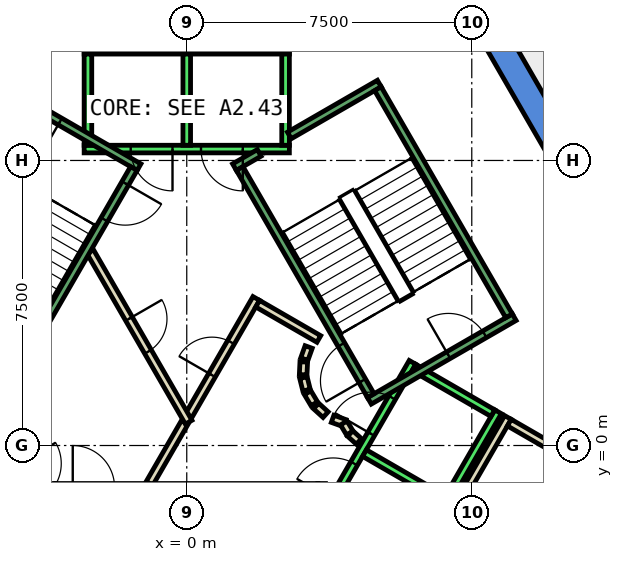
"""IFC4 building model, lengths in metres.
Left out: names, types, materials, properties, quantities, classifications, styles, units other than length and angle.
Written with IfcOpenShell. Run it as: python <this file> out.ifc"""

import sys

from ifc_helpers import new_model, si_unit, direction, frame, frame_2d, origin, place, context, subcontext, project, spatial, polyline, rectangle, outline, extrude, element, fill, save


model = new_model("IFC4")
c1 = context("Model", 3, precision=1e-05, world=origin(), true_north=direction((0.0, 1.0)))
c2 = subcontext(c1, "Body", "Model", "MODEL_VIEW")
j1 = project(units=[si_unit("LENGTHUNIT", "METRE"), si_unit("PLANEANGLEUNIT", "RADIAN")], contexts=[c1])
p1 = place(None, origin())
s1 = spatial("IfcSite", under=j1, at=p1, CompositionType="ELEMENT")
p2 = place(p1, origin())
s2 = spatial("IfcBuilding", under=s1, at=p2, CompositionType="ELEMENT")
p3 = place(p2, frame((0.0, 0.0, 210.8)))
s3 = spatial("IfcBuildingStorey", under=s2, at=p3, CompositionType="ELEMENT", Elevation=210.8)
p4 = place(p3, frame((0.0, 0.0, -0.4)))
e1 = element("IfcWall", 1, at=p4, inside=s3, PredefinedType="SHEAR", context=c2, shape_type="SweptSolid", body=[
    extrude(outline(polyline([(8.084, 11.498), (7.478, 11.148), (12.471, 2.5), (13.279, 2.5), (8.084, 11.498)])), origin(), (0.0, 0.0, 1.0), 4.2),
])
p5 = place(p3, frame((0.0, 0.0, -0.4)))
e2 = element("IfcWall", 2, at=p5, inside=s3, PredefinedType="SHEAR", context=c2, shape_type="SweptSolid", body=[
    extrude(outline(polyline([(6.64, -9.0), (13.279, 2.5), (12.471, 2.5), (6.235, -8.3), (6.64, -9.0)])), origin(), (0.0, 0.0, 1.0), 4.2),
])
p6 = place(p3, frame((5.751, -3.938, 0.0), z_axis=(0.0, 0.0, 1.0), x_axis=(0.500034260056, 0.866005622828, 0.0)))
e3 = element("IfcWall", 3, at=p6, inside=s3, PredefinedType="PARTITIONING", context=c2, shape_type="SweptSolid", body=[
    extrude(rectangle(XDim=5.399, YDim=0.2, at=frame_2d((2.7, 0.0))), origin(), (0.0, 0.0, 1.0), 3.8),
])
p7 = place(p3, frame((8.488, 0.602, 0.0), z_axis=(0.0, 0.0, 1.0), x_axis=(0.866022959057, -0.500004234368, 0.0)))
e4 = element("IfcWall", 4, at=p7, inside=s3, PredefinedType="PARTITIONING", context=c2, shape_type="SweptSolid", body=[
    extrude(rectangle(XDim=2.5, YDim=0.2, at=frame_2d((1.25, 0.0))), origin(), (0.0, 0.0, 1.0), 3.8),
])
p8 = place(p3, frame((-0.982, -1.0, 0.0), z_axis=(0.0, 0.0, 1.0), x_axis=(0.50024047865, 0.865886518847, 0.0)))
e5 = element("IfcWall", 5, at=p8, inside=s3, PredefinedType="PARTITIONING", context=c2, shape_type="SweptSolid", body=[
    extrude(rectangle(XDim=1.863, YDim=0.2, at=frame_2d((0.931, 0.0))), origin(), (0.0, 0.0, 1.0), 3.8),
])
p9 = place(p3, frame((0.05, 0.787, 0.0), z_axis=(0.0, 0.0, 1.0), x_axis=(0.499954076797, 0.866051915934, 0.0)))
e6 = element("IfcWall", 6, at=p9, inside=s3, PredefinedType="PARTITIONING", context=c2, shape_type="SweptSolid", body=[
    extrude(rectangle(XDim=3.558, YDim=0.2, at=frame_2d((1.779, 0.0))), origin(), (0.0, 0.0, 1.0), 3.8),
])
p10 = place(p9, frame((1.229, 0.0, 0.0)))
e7 = element("IfcOpeningElement", 7, at=p10, cuts=e6, PredefinedType="OPENING", context=c2, shape_type="SweptSolid", body=[
    extrude(rectangle(XDim=1.0, YDim=2.1, at=frame_2d((0.5, 1.05))), frame((0.0, 0.11, 0.0), z_axis=(0.0, -1.0, 0.0), x_axis=(1.0, 0.0, 0.0)), (0.0, 0.0, 1.0), 0.22),
])
p11 = place(p3, frame((1.866, 3.732, 0.0), z_axis=(0.0, 0.0, 1.0), x_axis=(0.866043361281, -0.499968895414, 0.0)))
e8 = element("IfcWall", 8, at=p11, inside=s3, PredefinedType="PARTITIONING", context=c2, shape_type="SweptSolid", body=[
    extrude(rectangle(XDim=1.858, YDim=0.2, at=frame_2d((0.929, 0.0))), origin(), (0.0, 0.0, 1.0), 3.8),
])
p12 = place(p3, frame((3.208, 2.592, 0.0), z_axis=(0.0, 0.0, 1.0), x_axis=(-0.337388820924, -0.941365382578, 0.0)))
e9 = element("IfcWall", 9, at=p12, inside=s3, PredefinedType="PARTITIONING", context=c2, shape_type="SweptSolid", body=[
    extrude(rectangle(XDim=0.338, YDim=0.2, at=frame_2d((0.169, 0.0))), origin(), (0.0, 0.0, 1.0), 3.8),
])
p13 = place(p3, frame((3.079, 2.199, 0.0), z_axis=(0.0, 0.0, 1.0), x_axis=(-0.047771483479, -0.998858290933, 0.0)))
e10 = element("IfcWall", 10, at=p13, inside=s3, PredefinedType="PARTITIONING", context=c2, shape_type="SweptSolid", body=[
    extrude(rectangle(XDim=0.337, YDim=0.2, at=frame_2d((0.169, 0.0))), origin(), (0.0, 0.0, 1.0), 3.8),
])
p14 = place(p3, frame((3.07, 1.786, 0.0), z_axis=(0.0, 0.0, 1.0), x_axis=(0.242705583207, -0.970099994784, 0.0)))
e11 = element("IfcWall", 11, at=p14, inside=s3, PredefinedType="PARTITIONING", context=c2, shape_type="SweptSolid", body=[
    extrude(rectangle(XDim=0.338, YDim=0.2, at=frame_2d((0.169, 0.0))), origin(), (0.0, 0.0, 1.0), 3.8),
])
for number, where, z_axis, x_axis in (
    (12, (3.182, 1.388, 0.0), (0.0, 0.0, 1.0), (0.512, -0.859, 0.0)),
    (13, (3.404, 1.039, 0.0), (0.0, 0.0, 1.0), (0.74, -0.672, 0.0)),
):
    element("IfcWall", number, at=place(p3, frame(where, z_axis=z_axis, x_axis=x_axis)), inside=s3, PredefinedType="PARTITIONING", context=c2, shape_type="SweptSolid", body=[
        extrude(rectangle(XDim=0.338, YDim=0.2, at=frame_2d((0.169, 0.0))), origin(), (0.0, 0.0, 1.0), 3.8),
    ])
p15 = place(p3, frame((3.838, 0.702, 0.0), z_axis=(0.0, 0.0, 1.0), x_axis=(0.941035081519, -0.338308993895, 0.0)))
e14 = element("IfcWall", 14, at=p15, inside=s3, PredefinedType="PARTITIONING", context=c2, shape_type="SweptSolid", body=[
    extrude(rectangle(XDim=0.337, YDim=0.2, at=frame_2d((0.168, 0.0))), origin(), (0.0, 0.0, 1.0), 3.8),
])
p16 = place(p3, frame((4.132, 0.593, 0.0), z_axis=(0.0, 0.0, 1.0), x_axis=(0.513561617048, -0.858052717201, 0.0)))
e15 = element("IfcWall", 15, at=p16, inside=s3, PredefinedType="PARTITIONING", context=c2, shape_type="SweptSolid", body=[
    extrude(rectangle(XDim=0.308, YDim=0.2, at=frame_2d((0.154, 0.0))), origin(), (0.0, 0.0, 1.0), 3.8),
])
p17 = place(p3, frame((4.301, 0.315, 0.0), z_axis=(0.0, 0.0, 1.0), x_axis=(0.741798017506, -0.670623367639, 0.0)))
e16 = element("IfcWall", 16, at=p17, inside=s3, PredefinedType="PARTITIONING", context=c2, shape_type="SweptSolid", body=[
    extrude(rectangle(XDim=0.309, YDim=0.2, at=frame_2d((0.154, 0.0))), origin(), (0.0, 0.0, 1.0), 3.8),
])
p18 = place(p3, frame((-2.54, 5.1, 0.0), z_axis=(0.0, 0.0, 1.0), x_axis=(0.499925051871, -0.866068670783, 0.0)))
e17 = element("IfcWall", 17, at=p18, inside=s3, PredefinedType="PARTITIONING", context=c2, shape_type="SweptSolid", body=[
    extrude(rectangle(XDim=5.181, YDim=0.2, at=frame_2d((2.59, 0.0))), origin(), (0.0, 0.0, 1.0), 3.8),
])
p19 = place(p18, frame((2.04, 0.0, 0.0)))
e18 = element("IfcOpeningElement", 18, at=p19, cuts=e17, PredefinedType="OPENING", context=c2, shape_type="SweptSolid", body=[
    extrude(rectangle(XDim=1.0, YDim=2.1, at=frame_2d((0.5, 1.05))), frame((0.0, 0.11, 0.0), z_axis=(0.0, -1.0, 0.0), x_axis=(1.0, 0.0, 0.0)), (0.0, 0.0, 1.0), 0.22),
])
p20 = place(p3, frame((2.7, 7.8, 0.0), z_axis=(0.0, 0.0, 1.0), x_axis=(-1.0, 0.0, 0.0)))
e19 = element("IfcWall", 19, at=p20, inside=s3, PredefinedType="STANDARD", context=c2, shape_type="SweptSolid", body=[
    extrude(rectangle(XDim=5.4, YDim=0.2, at=frame_2d((2.7, 0.0))), origin(), (0.0, 0.0, 1.0), 3.8),
])
p21 = place(p20, frame((1.225, 0.0, 0.0)))
e20 = element("IfcOpeningElement", 20, at=p21, cuts=e19, PredefinedType="OPENING", context=c2, shape_type="SweptSolid", body=[
    extrude(rectangle(XDim=1.1, YDim=2.1, at=frame_2d((0.55, 1.05))), frame((0.0, 0.11, 0.0), z_axis=(0.0, -1.0, 0.0), x_axis=(1.0, 0.0, 0.0)), (0.0, 0.0, 1.0), 0.22),
])
p22 = place(p20, frame((3.075, 0.0, 0.0)))
e21 = element("IfcOpeningElement", 21, at=p22, cuts=e19, PredefinedType="OPENING", context=c2, shape_type="SweptSolid", body=[
    extrude(rectangle(XDim=1.1, YDim=2.1, at=frame_2d((0.55, 1.05))), frame((0.0, 0.11, 0.0), z_axis=(0.0, -1.0, 0.0), x_axis=(1.0, 0.0, 0.0)), (0.0, 0.0, 1.0), 0.22),
])
p23 = place(p3, frame((2.7, 10.4, 0.0), z_axis=(0.0, 0.0, 1.0), x_axis=(-1.0, 0.0, 0.0)))
e22 = element("IfcWall", 22, at=p23, inside=s3, PredefinedType="STANDARD", context=c2, shape_type="SweptSolid", body=[
    extrude(rectangle(XDim=5.4, YDim=0.2, at=frame_2d((2.7, 0.0))), origin(), (0.0, 0.0, 1.0), 3.8),
])
for number, where, z_axis, x_axis in (
    (23, (2.6, 7.9, 0.0), (0.0, 0.0, 1.0), (0.0, 1.0, 0.0)),
    (24, (0.0, 7.9, 0.0), (0.0, 0.0, 1.0), (0.0, 1.0, 0.0)),
    (25, (-2.6, 7.9, 0.0), (0.0, 0.0, 1.0), (0.0, 1.0, 0.0)),
):
    element("IfcWall", number, at=place(p3, frame(where, z_axis=z_axis, x_axis=x_axis)), inside=s3, PredefinedType="STANDARD", context=c2, shape_type="SweptSolid", body=[
        extrude(rectangle(XDim=2.4, YDim=0.2, at=frame_2d((1.2, 0.0))), origin(), (0.0, 0.0, 1.0), 3.8),
    ])
p24 = place(p3, frame((-5.94, 2.188, 0.0), z_axis=(0.0, 0.0, 1.0), x_axis=(0.500034260056, -0.866005622828, 0.0)))
e26 = element("IfcWall", 26, at=p24, inside=s3, PredefinedType="STANDARD", context=c2, shape_type="SweptSolid", body=[
    extrude(rectangle(XDim=5.399, YDim=0.2, at=frame_2d((2.7, 0.0))), origin(), (0.0, 0.0, 1.0), 3.8),
])
p25 = place(p24, frame((3.075, 0.0, 0.0)))
e27 = element("IfcOpeningElement", 27, at=p25, cuts=e26, PredefinedType="OPENING", context=c2, shape_type="SweptSolid", body=[
    extrude(rectangle(XDim=1.1, YDim=2.1, at=frame_2d((0.55, 1.05))), frame((0.0, 0.11, 0.0), z_axis=(0.0, -1.0, 0.0), x_axis=(1.0, 0.0, 0.0)), (0.0, 0.0, 1.0), 0.22),
])
p26 = place(p24, frame((1.225, 0.0, 0.0)))
e28 = element("IfcOpeningElement", 28, at=p26, cuts=e26, PredefinedType="OPENING", context=c2, shape_type="SweptSolid", body=[
    extrude(rectangle(XDim=1.1, YDim=2.1, at=frame_2d((0.55, 1.05))), frame((0.0, 0.11, 0.0), z_axis=(0.0, -1.0, 0.0), x_axis=(1.0, 0.0, 0.0)), (0.0, 0.0, 1.0), 0.22),
])
p27 = place(p3, frame((3.24, -2.488, 0.0), z_axis=(0.0, 0.0, 1.0), x_axis=(0.500034260056, 0.866005622828, 0.0)))
e29 = element("IfcWall", 29, at=p27, inside=s3, PredefinedType="STANDARD", context=c2, shape_type="SweptSolid", body=[
    extrude(rectangle(XDim=5.399, YDim=0.2, at=frame_2d((2.7, 0.0))), origin(), (0.0, 0.0, 1.0), 3.8),
])
p28 = place(p27, frame((3.225, 0.0, 0.0)))
e30 = element("IfcOpeningElement", 30, at=p28, cuts=e29, PredefinedType="OPENING", context=c2, shape_type="SweptSolid", body=[
    extrude(rectangle(XDim=1.1, YDim=2.1, at=frame_2d((0.55, 1.05))), frame((0.0, 0.11, 0.0), z_axis=(0.0, -1.0, 0.0), x_axis=(1.0, 0.0, 0.0)), (0.0, 0.0, 1.0), 0.22),
])
p29 = place(p27, frame((1.225, 0.0, 0.0)))
e31 = element("IfcOpeningElement", 31, at=p29, cuts=e29, PredefinedType="OPENING", context=c2, shape_type="SweptSolid", body=[
    extrude(rectangle(XDim=1.1, YDim=2.1, at=frame_2d((0.55, 1.05))), frame((0.0, 0.11, 0.0), z_axis=(0.0, -1.0, 0.0), x_axis=(1.0, 0.0, 0.0)), (0.0, 0.0, 1.0), 0.22),
])
p30 = place(p3, frame((5.492, -3.788, 0.0), z_axis=(0.0, 0.0, 1.0), x_axis=(0.500034260056, 0.866005622828, 0.0)))
e32 = element("IfcWall", 32, at=p30, inside=s3, PredefinedType="STANDARD", context=c2, shape_type="SweptSolid", body=[
    extrude(rectangle(XDim=5.399, YDim=0.2, at=frame_2d((2.7, 0.0))), origin(), (0.0, 0.0, 1.0), 3.8),
])
for number, where, z_axis, x_axis in (
    (33, (4.677, -0.2, 0.0), (0.0, 0.0, 1.0), (0.866, -0.5, 0.0)),
    (34, (5.977, 2.052, 0.0), (0.0, 0.0, 1.0), (0.866, -0.5, 0.0)),
):
    element("IfcWall", number, at=place(p3, frame(where, z_axis=z_axis, x_axis=x_axis)), inside=s3, PredefinedType="STANDARD", context=c2, shape_type="SweptSolid", body=[
        extrude(rectangle(XDim=2.399, YDim=0.2, at=frame_2d((1.2, 0.0))), origin(), (0.0, 0.0, 1.0), 3.8),
    ])
p31 = place(p3, frame((4.806, 1.176, 0.0), z_axis=(0.0, 0.0, 1.0), x_axis=(0.866059941101, 0.499940174841, 0.0)))
e35 = element("IfcWall", 35, at=p31, inside=s3, PredefinedType="STANDARD", context=c2, shape_type="SweptSolid", body=[
    extrude(rectangle(XDim=4.4, YDim=0.2, at=frame_2d((2.2, 0.0))), origin(), (0.0, 0.0, 1.0), 3.8),
])
p32 = place(p31, frame((2.4, 0.0, 0.0)))
e36 = element("IfcOpeningElement", 36, at=p32, cuts=e35, PredefinedType="OPENING", context=c2, shape_type="SweptSolid", body=[
    extrude(rectangle(XDim=1.1, YDim=2.2, at=frame_2d((0.55, 1.1))), frame((0.0, 0.11, 0.0), z_axis=(0.0, -1.0, 0.0), x_axis=(1.0, 0.0, 0.0)), (0.0, 0.0, 1.0), 0.22),
])
p33 = place(p3, frame((2.7, 8.158, 0.0), z_axis=(0.0, 0.0, 1.0), x_axis=(0.86611865017, 0.499838457731, 0.0)))
e37 = element("IfcWall", 37, at=p33, inside=s3, PredefinedType="STANDARD", context=c2, shape_type="SweptSolid", body=[
    extrude(rectangle(XDim=2.733, YDim=0.2, at=frame_2d((1.366, 0.0))), origin(), (0.0, 0.0, 1.0), 3.8),
])
p34 = place(p3, frame((1.256, 7.324, 0.0), z_axis=(0.0, 0.0, 1.0), x_axis=(0.865915093549, 0.500191014278, 0.0)))
e38 = element("IfcWall", 38, at=p34, inside=s3, PredefinedType="STANDARD", context=c2, shape_type="SweptSolid", body=[
    extrude(rectangle(XDim=0.752, YDim=0.2, at=frame_2d((0.376, 0.0))), origin(), (0.0, 0.0, 1.0), 3.8),
])
p35 = place(p3, frame((4.843, 1.312, 0.0), z_axis=(0.0, 0.0, 1.0), x_axis=(-0.499963383562, 0.866046543262, 0.0)))
e39 = element("IfcWall", 39, at=p35, inside=s3, PredefinedType="STANDARD", context=c2, shape_type="SweptSolid", body=[
    extrude(rectangle(XDim=6.9, YDim=0.2, at=frame_2d((3.45, 0.0))), origin(), (0.0, 0.0, 1.0), 3.8),
])
p36 = place(p35, frame((0.45, 0.0, 0.0)))
e40 = element("IfcOpeningElement", 40, at=p36, cuts=e39, PredefinedType="OPENING", context=c2, shape_type="SweptSolid", body=[
    extrude(rectangle(XDim=1.1, YDim=2.2, at=frame_2d((0.55, 1.1))), frame((0.0, 0.11, 0.0), z_axis=(0.0, -1.0, 0.0), x_axis=(1.0, 0.0, 0.0)), (0.0, 0.0, 1.0), 0.22),
])
p37 = place(p3, frame((8.48, 3.412, 0.0), z_axis=(0.0, 0.0, 1.0), x_axis=(-0.499978703459, 0.866037698999, 0.0)))
e41 = element("IfcWall", 41, at=p37, inside=s3, PredefinedType="STANDARD", context=c2, shape_type="SweptSolid", body=[
    extrude(rectangle(XDim=6.9, YDim=0.2, at=frame_2d((3.45, 0.0))), origin(), (0.0, 0.0, 1.0), 3.8),
])
p38 = place(p3, frame((-1.256, 7.324, 0.0), z_axis=(0.0, 0.0, 1.0), x_axis=(-0.866046073146, 0.499964197906, 0.0)))
e42 = element("IfcWall", 42, at=p38, inside=s3, PredefinedType="STANDARD", context=c2, shape_type="SweptSolid", body=[
    extrude(rectangle(XDim=4.4, YDim=0.2, at=frame_2d((2.2, 0.0))), origin(), (0.0, 0.0, 1.0), 3.8),
])
p39 = place(p38, frame((2.4, 0.0, 0.0)))
e43 = element("IfcOpeningElement", 43, at=p39, cuts=e42, PredefinedType="OPENING", context=c2, shape_type="SweptSolid", body=[
    extrude(rectangle(XDim=1.1, YDim=2.2, at=frame_2d((0.55, 1.1))), frame((0.0, 0.11, 0.0), z_axis=(0.0, -1.0, 0.0), x_axis=(1.0, 0.0, 0.0)), (0.0, 0.0, 1.0), 0.22),
])
p40 = place(p3, frame((-1.393, 7.288, 0.0), z_axis=(0.0, 0.0, 1.0), x_axis=(-0.499963383562, -0.866046543262, 0.0)))
e44 = element("IfcWall", 44, at=p40, inside=s3, PredefinedType="STANDARD", context=c2, shape_type="SweptSolid", body=[
    extrude(rectangle(XDim=6.9, YDim=0.2, at=frame_2d((3.45, 0.0))), origin(), (0.0, 0.0, 1.0), 3.8),
])
p41 = place(p40, frame((0.45, 0.0, 0.0)))
e45 = element("IfcOpeningElement", 45, at=p41, cuts=e44, PredefinedType="OPENING", context=c2, shape_type="SweptSolid", body=[
    extrude(rectangle(XDim=1.1, YDim=2.2, at=frame_2d((0.55, 1.1))), frame((0.0, 0.11, 0.0), z_axis=(0.0, -1.0, 0.0), x_axis=(1.0, 0.0, 0.0)), (0.0, 0.0, 1.0), 0.22),
])
p42 = place(p10, origin())
e46 = element("IfcDoor", 46, at=p42, inside=s3, OperationType="SINGLE_SWING_RIGHT", PredefinedType="DOOR", context=c2, shape_type="SweptSolid", body=[
    extrude(rectangle(XDim=1.0, YDim=2.1, at=frame_2d((0.5, 1.05))), frame((0.0, 0.025, 0.0), z_axis=(0.0, -1.0, 0.0), x_axis=(1.0, 0.0, 0.0)), (0.0, 0.0, 1.0), 0.05),
])
fill(e7, e46)
p43 = place(p19, origin())
e47 = element("IfcDoor", 47, at=p43, inside=s3, OperationType="SINGLE_SWING_RIGHT", PredefinedType="DOOR", context=c2, shape_type="SweptSolid", body=[
    extrude(rectangle(XDim=1.0, YDim=2.1, at=frame_2d((0.5, 1.05))), frame((0.0, 0.025, 0.0), z_axis=(0.0, -1.0, 0.0), x_axis=(1.0, 0.0, 0.0)), (0.0, 0.0, 1.0), 0.05),
])
fill(e18, e47)
p44 = place(p21, origin())
e48 = element("IfcDoor", 48, at=p44, inside=s3, OperationType="SLIDING_TO_LEFT", PredefinedType="DOOR", context=c2, shape_type="SweptSolid", body=[
    extrude(rectangle(XDim=1.1, YDim=2.1, at=frame_2d((0.55, 1.05))), frame((0.0, 0.025, 0.0), z_axis=(0.0, -1.0, 0.0), x_axis=(1.0, 0.0, 0.0)), (0.0, 0.0, 1.0), 0.05),
])
fill(e20, e48)
p45 = place(p22, origin())
e49 = element("IfcDoor", 49, at=p45, inside=s3, OperationType="SLIDING_TO_LEFT", PredefinedType="DOOR", context=c2, shape_type="SweptSolid", body=[
    extrude(rectangle(XDim=1.1, YDim=2.1, at=frame_2d((0.55, 1.05))), frame((0.0, 0.025, 0.0), z_axis=(0.0, -1.0, 0.0), x_axis=(1.0, 0.0, 0.0)), (0.0, 0.0, 1.0), 0.05),
])
fill(e21, e49)
p46 = place(p28, origin())
e50 = element("IfcDoor", 50, at=p46, inside=s3, OperationType="SLIDING_TO_LEFT", PredefinedType="DOOR", context=c2, shape_type="SweptSolid", body=[
    extrude(rectangle(XDim=1.1, YDim=2.1, at=frame_2d((0.55, 1.05))), frame((0.0, 0.025, 0.0), z_axis=(0.0, -1.0, 0.0), x_axis=(1.0, 0.0, 0.0)), (0.0, 0.0, 1.0), 0.05),
])
fill(e30, e50)
p47 = place(p29, origin())
e51 = element("IfcDoor", 51, at=p47, inside=s3, OperationType="SLIDING_TO_LEFT", PredefinedType="DOOR", context=c2, shape_type="SweptSolid", body=[
    extrude(rectangle(XDim=1.1, YDim=2.1, at=frame_2d((0.55, 1.05))), frame((0.0, 0.025, 0.0), z_axis=(0.0, -1.0, 0.0), x_axis=(1.0, 0.0, 0.0)), (0.0, 0.0, 1.0), 0.05),
])
fill(e31, e51)
p48 = place(p36, origin())
e52 = element("IfcDoor", 52, at=p48, inside=s3, OperationType="SINGLE_SWING_LEFT", PredefinedType="DOOR", context=c2, shape_type="SweptSolid", body=[
    extrude(rectangle(XDim=1.1, YDim=2.2, at=frame_2d((0.55, 1.1))), frame((0.0, 0.025, 0.0), z_axis=(0.0, -1.0, 0.0), x_axis=(1.0, 0.0, 0.0)), (0.0, 0.0, 1.0), 0.05),
])
fill(e40, e52)
p49 = place(p32, origin())
e53 = element("IfcDoor", 53, at=p49, inside=s3, OperationType="SINGLE_SWING_LEFT", PredefinedType="DOOR", context=c2, shape_type="SweptSolid", body=[
    extrude(rectangle(XDim=1.1, YDim=2.2, at=frame_2d((0.55, 1.1))), frame((0.0, 0.025, 0.0), z_axis=(0.0, -1.0, 0.0), x_axis=(1.0, 0.0, 0.0)), (0.0, 0.0, 1.0), 0.05),
])
fill(e36, e53)
p50 = place(p41, origin())
e54 = element("IfcDoor", 54, at=p50, inside=s3, OperationType="SINGLE_SWING_LEFT", PredefinedType="DOOR", context=c2, shape_type="SweptSolid", body=[
    extrude(rectangle(XDim=1.1, YDim=2.2, at=frame_2d((0.55, 1.1))), frame((0.0, 0.025, 0.0), z_axis=(0.0, -1.0, 0.0), x_axis=(1.0, 0.0, 0.0)), (0.0, 0.0, 1.0), 0.05),
])
fill(e45, e54)
p51 = place(p39, origin())
e55 = element("IfcDoor", 55, at=p51, inside=s3, OperationType="SINGLE_SWING_LEFT", PredefinedType="DOOR", context=c2, shape_type="SweptSolid", body=[
    extrude(rectangle(XDim=1.1, YDim=2.2, at=frame_2d((0.55, 1.1))), frame((0.0, 0.025, 0.0), z_axis=(0.0, -1.0, 0.0), x_axis=(1.0, 0.0, 0.0)), (0.0, 0.0, 1.0), 0.05),
])
fill(e43, e55)
save(model, sys.argv[1])
